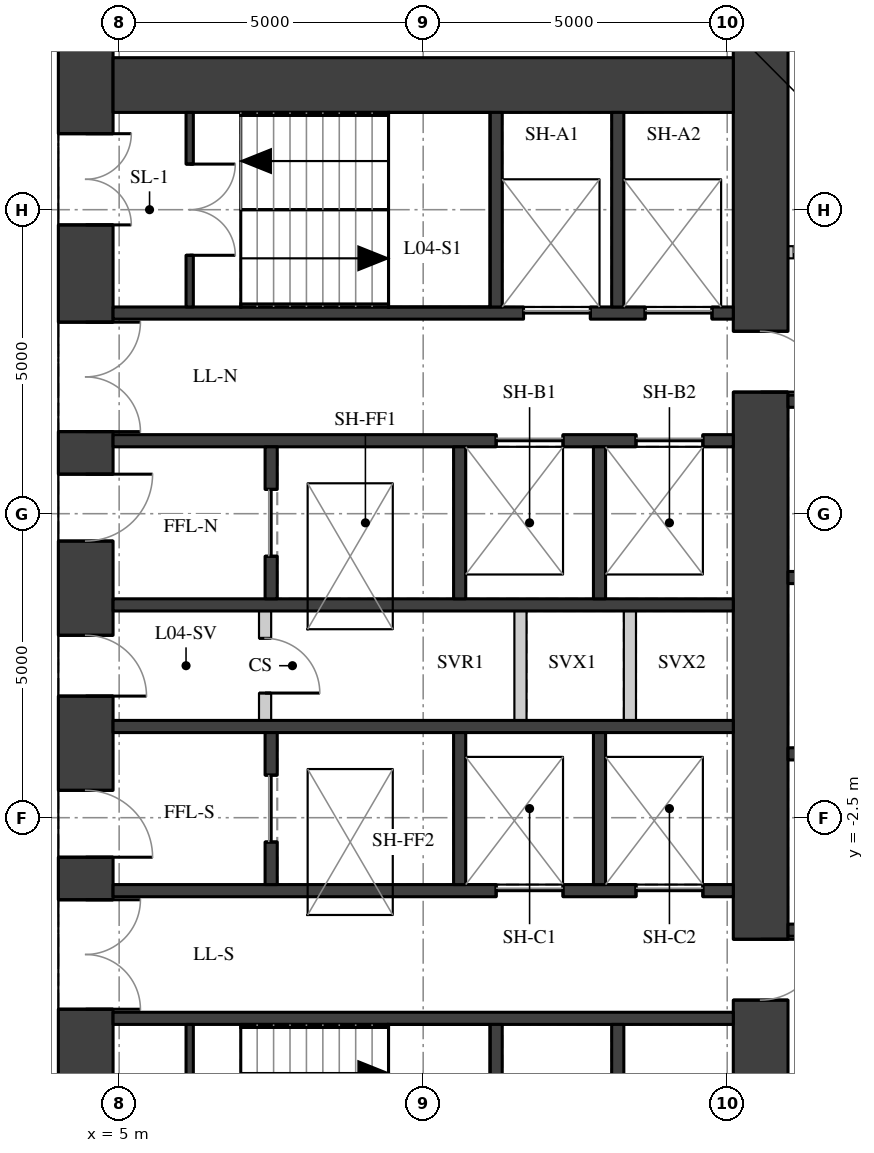
"""IFC4 building model, lengths in metres.
Left out: names, types, materials, properties, quantities, classifications, styles, units other than length and angle.
Written with IfcOpenShell. Run it as: python <this file> out.ifc"""

import sys

from ifc_helpers import new_model, si_unit, direction, frame, frame_2d, origin, place, context, subcontext, project, spatial, rectangle, extrude, element, fill, save


model = new_model("IFC4")
c1 = context("Model", 3, precision=1e-05, world=origin(), true_north=direction((0.0, 1.0)))
c2 = subcontext(c1, "Body", "Model", "MODEL_VIEW")
j1 = project(units=[si_unit("LENGTHUNIT", "METRE"), si_unit("PLANEANGLEUNIT", "RADIAN")], contexts=[c1])
p1 = place(None, origin())
s1 = spatial("IfcSite", under=j1, at=p1, CompositionType="ELEMENT")
p2 = place(p1, origin())
s2 = spatial("IfcBuilding", under=s1, at=p2, CompositionType="ELEMENT")
p3 = place(p2, frame((0.0, 0.0, 21.7)))
s3 = spatial("IfcBuildingStorey", under=s2, at=p3, CompositionType="ELEMENT", Elevation=21.7)
p4 = place(p3, frame((4.45, -11.1, 0.0), z_axis=(0.0, 0.0, 1.0), x_axis=(0.0, 1.0, 0.0)))
e1 = element("IfcWall", 1, at=p4, inside=s3, PredefinedType="SHEAR", context=c2, shape_type="SweptSolid", body=[
    extrude(rectangle(XDim=22.2, YDim=0.9, at=frame_2d((11.1, 0.0))), origin(), (0.0, 0.0, 1.0), 3.02),
])
p5 = place(p4, frame((2.35, 0.0, 0.0)))
e2 = element("IfcOpeningElement", 2, at=p5, cuts=e1, PredefinedType="OPENING", context=c2, shape_type="SweptSolid", body=[
    extrude(rectangle(XDim=1.5, YDim=2.1, at=frame_2d((0.75, 1.05))), frame((0.0, 0.46, 0.0), z_axis=(0.0, -1.0, 0.0), x_axis=(1.0, 0.0, 0.0)), (0.0, 0.0, 1.0), 0.92),
])
p6 = place(p4, frame((5.45, 0.0, 0.0)))
e3 = element("IfcOpeningElement", 3, at=p6, cuts=e1, PredefinedType="OPENING", context=c2, shape_type="SweptSolid", body=[
    extrude(rectangle(XDim=1.8, YDim=2.1, at=frame_2d((0.9, 1.05))), frame((0.0, 0.46, 0.0), z_axis=(0.0, -1.0, 0.0), x_axis=(1.0, 0.0, 0.0)), (0.0, 0.0, 1.0), 0.92),
])
p7 = place(p4, frame((7.95, 0.0, 0.0)))
e4 = element("IfcOpeningElement", 4, at=p7, cuts=e1, PredefinedType="OPENING", context=c2, shape_type="SweptSolid", body=[
    extrude(rectangle(XDim=1.1, YDim=2.1, at=frame_2d((0.55, 1.05))), frame((0.0, 0.46, 0.0), z_axis=(0.0, -1.0, 0.0), x_axis=(1.0, 0.0, 0.0)), (0.0, 0.0, 1.0), 0.92),
])
p8 = place(p4, frame((10.6, 0.0, 0.0)))
e5 = element("IfcOpeningElement", 5, at=p8, cuts=e1, PredefinedType="OPENING", context=c2, shape_type="SweptSolid", body=[
    extrude(rectangle(XDim=1.0, YDim=2.1, at=frame_2d((0.5, 1.05))), frame((0.0, 0.46, 0.0), z_axis=(0.0, -1.0, 0.0), x_axis=(1.0, 0.0, 0.0)), (0.0, 0.0, 1.0), 0.92),
])
p9 = place(p4, frame((13.15, 0.0, 0.0)))
e6 = element("IfcOpeningElement", 6, at=p9, cuts=e1, PredefinedType="OPENING", context=c2, shape_type="SweptSolid", body=[
    extrude(rectangle(XDim=1.1, YDim=2.1, at=frame_2d((0.55, 1.05))), frame((0.0, 0.46, 0.0), z_axis=(0.0, -1.0, 0.0), x_axis=(1.0, 0.0, 0.0)), (0.0, 0.0, 1.0), 0.92),
])
p10 = place(p4, frame((14.95, 0.0, 0.0)))
e7 = element("IfcOpeningElement", 7, at=p10, cuts=e1, PredefinedType="OPENING", context=c2, shape_type="SweptSolid", body=[
    extrude(rectangle(XDim=1.8, YDim=2.1, at=frame_2d((0.9, 1.05))), frame((0.0, 0.46, 0.0), z_axis=(0.0, -1.0, 0.0), x_axis=(1.0, 0.0, 0.0)), (0.0, 0.0, 1.0), 0.92),
])
p11 = place(p4, frame((18.35, 0.0, 0.0)))
e8 = element("IfcOpeningElement", 8, at=p11, cuts=e1, PredefinedType="OPENING", context=c2, shape_type="SweptSolid", body=[
    extrude(rectangle(XDim=1.5, YDim=2.1, at=frame_2d((0.75, 1.05))), frame((0.0, 0.46, 0.0), z_axis=(0.0, -1.0, 0.0), x_axis=(1.0, 0.0, 0.0)), (0.0, 0.0, 1.0), 0.92),
])
p12 = place(p3, frame((15.55, -11.1, 0.0), z_axis=(0.0, 0.0, 1.0), x_axis=(0.0, 1.0, 0.0)))
e9 = element("IfcWall", 9, at=p12, inside=s3, PredefinedType="SHEAR", context=c2, shape_type="SweptSolid", body=[
    extrude(rectangle(XDim=22.2, YDim=0.9, at=frame_2d((11.1, 0.0))), origin(), (0.0, 0.0, 1.0), 3.02),
])
p13 = place(p12, frame((15.6, 0.0, 0.0)))
e10 = element("IfcOpeningElement", 10, at=p13, cuts=e9, PredefinedType="OPENING", context=c2, shape_type="SweptSolid", body=[
    extrude(rectangle(XDim=1.0, YDim=2.1, at=frame_2d((0.5, 1.05))), frame((0.0, 0.46, 0.0), z_axis=(0.0, -1.0, 0.0), x_axis=(1.0, 0.0, 0.0)), (0.0, 0.0, 1.0), 0.92),
])
p14 = place(p12, frame((5.6, 0.0, 0.0)))
e11 = element("IfcOpeningElement", 11, at=p14, cuts=e9, PredefinedType="OPENING", context=c2, shape_type="SweptSolid", body=[
    extrude(rectangle(XDim=1.0, YDim=2.1, at=frame_2d((0.5, 1.05))), frame((0.0, 0.46, 0.0), z_axis=(0.0, -1.0, 0.0), x_axis=(1.0, 0.0, 0.0)), (0.0, 0.0, 1.0), 0.92),
])
p15 = place(p3, frame((4.9, 9.55, 0.0), z_axis=(0.0, 0.0, 1.0), x_axis=(1.0, 0.0, 0.0)))
e12 = element("IfcWall", 12, at=p15, inside=s3, PredefinedType="SHEAR", context=c2, shape_type="SweptSolid", body=[
    extrude(rectangle(XDim=10.2, YDim=0.9, at=frame_2d((5.1, 0.0))), origin(), (0.0, 0.0, 1.0), 3.02),
])
p16 = place(p3, frame((4.9, 5.8, 0.0), z_axis=(0.0, 0.0, 1.0), x_axis=(1.0, 0.0, 0.0)))
e13 = element("IfcWall", 13, at=p16, inside=s3, PredefinedType="SHEAR", context=c2, shape_type="SweptSolid", body=[
    extrude(rectangle(XDim=10.2, YDim=0.2, at=frame_2d((5.1, 0.0))), origin(), (0.0, 0.0, 1.0), 3.02),
])
p17 = place(p16, frame((6.75, 0.0, 0.0)))
e14 = element("IfcOpeningElement", 14, at=p17, cuts=e13, PredefinedType="OPENING", context=c2, shape_type="SweptSolid", body=[
    extrude(rectangle(XDim=1.1, YDim=2.1, at=frame_2d((0.55, 1.05))), frame((0.0, 0.11, 0.0), z_axis=(0.0, -1.0, 0.0), x_axis=(1.0, 0.0, 0.0)), (0.0, 0.0, 1.0), 0.22),
])
p18 = place(p16, frame((8.75, 0.0, 0.0)))
e15 = element("IfcOpeningElement", 15, at=p18, cuts=e13, PredefinedType="OPENING", context=c2, shape_type="SweptSolid", body=[
    extrude(rectangle(XDim=1.1, YDim=2.1, at=frame_2d((0.55, 1.05))), frame((0.0, 0.11, 0.0), z_axis=(0.0, -1.0, 0.0), x_axis=(1.0, 0.0, 0.0)), (0.0, 0.0, 1.0), 0.22),
])
p19 = place(p3, frame((4.9, 3.7, 0.0), z_axis=(0.0, 0.0, 1.0), x_axis=(1.0, 0.0, 0.0)))
e16 = element("IfcWall", 16, at=p19, inside=s3, PredefinedType="SHEAR", context=c2, shape_type="SweptSolid", body=[
    extrude(rectangle(XDim=10.2, YDim=0.2, at=frame_2d((5.1, 0.0))), origin(), (0.0, 0.0, 1.0), 3.02),
])
p20 = place(p19, frame((6.3, 0.0, 0.0)))
e17 = element("IfcOpeningElement", 17, at=p20, cuts=e16, PredefinedType="OPENING", context=c2, shape_type="SweptSolid", body=[
    extrude(rectangle(XDim=1.1, YDim=2.1, at=frame_2d((0.55, 1.05))), frame((0.0, 0.11, 0.0), z_axis=(0.0, -1.0, 0.0), x_axis=(1.0, 0.0, 0.0)), (0.0, 0.0, 1.0), 0.22),
])
p21 = place(p19, frame((8.6, 0.0, 0.0)))
e18 = element("IfcOpeningElement", 18, at=p21, cuts=e16, PredefinedType="OPENING", context=c2, shape_type="SweptSolid", body=[
    extrude(rectangle(XDim=1.1, YDim=2.1, at=frame_2d((0.55, 1.05))), frame((0.0, 0.11, 0.0), z_axis=(0.0, -1.0, 0.0), x_axis=(1.0, 0.0, 0.0)), (0.0, 0.0, 1.0), 0.22),
])
for number, where, z_axis, x_axis in (
    (19, (4.9, 1.0, 0.0), (0.0, 0.0, 1.0), (1.0, 0.0, 0.0)),
    (20, (4.9, -1.0, 0.0), (0.0, 0.0, 1.0), (1.0, 0.0, 0.0)),
):
    element("IfcWall", number, at=place(p3, frame(where, z_axis=z_axis, x_axis=x_axis)), inside=s3, PredefinedType="SHEAR", context=c2, shape_type="SweptSolid", body=[
        extrude(rectangle(XDim=10.2, YDim=0.2, at=frame_2d((5.1, 0.0))), origin(), (0.0, 0.0, 1.0), 3.02),
    ])
p22 = place(p3, frame((4.9, -3.7, 0.0), z_axis=(0.0, 0.0, 1.0), x_axis=(1.0, 0.0, 0.0)))
e21 = element("IfcWall", 21, at=p22, inside=s3, PredefinedType="SHEAR", context=c2, shape_type="SweptSolid", body=[
    extrude(rectangle(XDim=10.2, YDim=0.2, at=frame_2d((5.1, 0.0))), origin(), (0.0, 0.0, 1.0), 3.02),
])
p23 = place(p22, frame((6.3, 0.0, 0.0)))
e22 = element("IfcOpeningElement", 22, at=p23, cuts=e21, PredefinedType="OPENING", context=c2, shape_type="SweptSolid", body=[
    extrude(rectangle(XDim=1.1, YDim=2.1, at=frame_2d((0.55, 1.05))), frame((0.0, 0.11, 0.0), z_axis=(0.0, -1.0, 0.0), x_axis=(1.0, 0.0, 0.0)), (0.0, 0.0, 1.0), 0.22),
])
p24 = place(p22, frame((8.6, 0.0, 0.0)))
e23 = element("IfcOpeningElement", 23, at=p24, cuts=e21, PredefinedType="OPENING", context=c2, shape_type="SweptSolid", body=[
    extrude(rectangle(XDim=1.1, YDim=2.1, at=frame_2d((0.55, 1.05))), frame((0.0, 0.11, 0.0), z_axis=(0.0, -1.0, 0.0), x_axis=(1.0, 0.0, 0.0)), (0.0, 0.0, 1.0), 0.22),
])
p25 = place(p3, frame((4.9, -5.8, 0.0), z_axis=(0.0, 0.0, 1.0), x_axis=(1.0, 0.0, 0.0)))
e24 = element("IfcWall", 24, at=p25, inside=s3, PredefinedType="SHEAR", context=c2, shape_type="SweptSolid", body=[
    extrude(rectangle(XDim=10.2, YDim=0.2, at=frame_2d((5.1, 0.0))), origin(), (0.0, 0.0, 1.0), 3.02),
])
for number, where, z_axis, x_axis in (
    (25, (11.2, 5.9, 0.0), (0.0, 0.0, 1.0), (0.0, 1.0, 0.0)),
    (26, (11.2, -9.1, 0.0), (0.0, 0.0, 1.0), (0.0, 1.0, 0.0)),
    (27, (13.2, 5.9, 0.0), (0.0, 0.0, 1.0), (0.0, 1.0, 0.0)),
    (28, (13.2, -9.1, 0.0), (0.0, 0.0, 1.0), (0.0, 1.0, 0.0)),
):
    element("IfcWall", number, at=place(p3, frame(where, z_axis=z_axis, x_axis=x_axis)), inside=s3, PredefinedType="SHEAR", context=c2, shape_type="SweptSolid", body=[
        extrude(rectangle(XDim=3.2, YDim=0.2, at=frame_2d((1.6, 0.0))), origin(), (0.0, 0.0, 1.0), 3.02),
    ])
p26 = place(p3, frame((7.5, 1.1, 0.0), z_axis=(0.0, 0.0, 1.0), x_axis=(0.0, 1.0, 0.0)))
e29 = element("IfcWall", 29, at=p26, inside=s3, PredefinedType="SHEAR", context=c2, shape_type="SweptSolid", body=[
    extrude(rectangle(XDim=2.5, YDim=0.2, at=frame_2d((1.25, 0.0))), origin(), (0.0, 0.0, 1.0), 3.02),
])
p27 = place(p26, frame((0.7, 0.0, 0.0)))
e30 = element("IfcOpeningElement", 30, at=p27, cuts=e29, PredefinedType="OPENING", context=c2, shape_type="SweptSolid", body=[
    extrude(rectangle(XDim=1.1, YDim=2.1, at=frame_2d((0.55, 1.05))), frame((0.0, 0.11, 0.0), z_axis=(0.0, -1.0, 0.0), x_axis=(1.0, 0.0, 0.0)), (0.0, 0.0, 1.0), 0.22),
])
p28 = place(p3, frame((7.5, -3.6, 0.0), z_axis=(0.0, 0.0, 1.0), x_axis=(0.0, 1.0, 0.0)))
e31 = element("IfcWall", 31, at=p28, inside=s3, PredefinedType="SHEAR", context=c2, shape_type="SweptSolid", body=[
    extrude(rectangle(XDim=2.5, YDim=0.2, at=frame_2d((1.25, 0.0))), origin(), (0.0, 0.0, 1.0), 3.02),
])
p29 = place(p28, frame((0.7, 0.0, 0.0)))
e32 = element("IfcOpeningElement", 32, at=p29, cuts=e31, PredefinedType="OPENING", context=c2, shape_type="SweptSolid", body=[
    extrude(rectangle(XDim=1.1, YDim=2.1, at=frame_2d((0.55, 1.05))), frame((0.0, 0.11, 0.0), z_axis=(0.0, -1.0, 0.0), x_axis=(1.0, 0.0, 0.0)), (0.0, 0.0, 1.0), 0.22),
])
for number, where, z_axis, x_axis in (
    (33, (10.6, 1.1, 0.0), (0.0, 0.0, 1.0), (0.0, 1.0, 0.0)),
    (34, (10.6, -3.6, 0.0), (0.0, 0.0, 1.0), (0.0, 1.0, 0.0)),
    (35, (12.9, 1.1, 0.0), (0.0, 0.0, 1.0), (0.0, 1.0, 0.0)),
    (36, (12.9, -3.6, 0.0), (0.0, 0.0, 1.0), (0.0, 1.0, 0.0)),
):
    element("IfcWall", number, at=place(p3, frame(where, z_axis=z_axis, x_axis=x_axis)), inside=s3, PredefinedType="SHEAR", context=c2, shape_type="SweptSolid", body=[
        extrude(rectangle(XDim=2.5, YDim=0.2, at=frame_2d((1.25, 0.0))), origin(), (0.0, 0.0, 1.0), 3.02),
    ])
p30 = place(p3, frame((6.16, 5.9, 0.0), z_axis=(0.0, 0.0, 1.0), x_axis=(0.0, 1.0, 0.0)))
e37 = element("IfcWall", 37, at=p30, inside=s3, PredefinedType="SHEAR", context=c2, shape_type="SweptSolid", body=[
    extrude(rectangle(XDim=3.2, YDim=0.12, at=frame_2d((1.6, 0.0))), origin(), (0.0, 0.0, 1.0), 3.02),
])
p31 = place(p30, frame((0.85, 0.0, 0.0)))
e38 = element("IfcOpeningElement", 38, at=p31, cuts=e37, PredefinedType="OPENING", context=c2, shape_type="SweptSolid", body=[
    extrude(rectangle(XDim=1.5, YDim=2.1, at=frame_2d((0.75, 1.05))), frame((0.0, 0.07, 0.0), z_axis=(0.0, -1.0, 0.0), x_axis=(1.0, 0.0, 0.0)), (0.0, 0.0, 1.0), 0.14),
])
p32 = place(p3, frame((6.16, -9.1, 0.0), z_axis=(0.0, 0.0, 1.0), x_axis=(0.0, 1.0, 0.0)))
e39 = element("IfcWall", 39, at=p32, inside=s3, PredefinedType="SHEAR", context=c2, shape_type="SweptSolid", body=[
    extrude(rectangle(XDim=3.2, YDim=0.12, at=frame_2d((1.6, 0.0))), origin(), (0.0, 0.0, 1.0), 3.02),
])
p33 = place(p32, frame((0.85, 0.0, 0.0)))
e40 = element("IfcOpeningElement", 40, at=p33, cuts=e39, PredefinedType="OPENING", context=c2, shape_type="SweptSolid", body=[
    extrude(rectangle(XDim=1.5, YDim=2.1, at=frame_2d((0.75, 1.05))), frame((0.0, 0.07, 0.0), z_axis=(0.0, -1.0, 0.0), x_axis=(1.0, 0.0, 0.0)), (0.0, 0.0, 1.0), 0.14),
])
p34 = place(p3, frame((7.4, -0.9, 0.0), z_axis=(0.0, 0.0, 1.0), x_axis=(0.0, 1.0, 0.0)))
e41 = element("IfcWall", 41, at=p34, inside=s3, PredefinedType="PARTITIONING", context=c2, shape_type="SweptSolid", body=[
    extrude(rectangle(XDim=1.8, YDim=0.2, at=frame_2d((0.9, 0.0))), origin(), (0.0, 0.0, 1.0), 3.02),
])
p35 = place(p34, frame((0.45, 0.0, 0.0)))
e42 = element("IfcOpeningElement", 42, at=p35, cuts=e41, PredefinedType="OPENING", context=c2, shape_type="SweptSolid", body=[
    extrude(rectangle(XDim=0.9, YDim=2.1, at=frame_2d((0.45, 1.05))), frame((0.0, 0.11, 0.0), z_axis=(0.0, -1.0, 0.0), x_axis=(1.0, 0.0, 0.0)), (0.0, 0.0, 1.0), 0.22),
])
for number, where, z_axis, x_axis in (
    (43, (11.6, -0.9, 0.0), (0.0, 0.0, 1.0), (0.0, 1.0, 0.0)),
    (44, (13.4, -0.9, 0.0), (0.0, 0.0, 1.0), (0.0, 1.0, 0.0)),
):
    element("IfcWall", number, at=place(p3, frame(where, z_axis=z_axis, x_axis=x_axis)), inside=s3, PredefinedType="PARTITIONING", context=c2, shape_type="SweptSolid", body=[
        extrude(rectangle(XDim=1.8, YDim=0.2, at=frame_2d((0.9, 0.0))), origin(), (0.0, 0.0, 1.0), 3.02),
    ])
for number, where, z_axis, x_axis in (
    (45, (16.0, -4.35, 0.0), (0.0, 0.0, 1.0), (1.0, 0.0, 0.0)),
    (46, (16.0, -1.45, 0.0), (0.0, 0.0, 1.0), (1.0, 0.0, 0.0)),
    (47, (16.0, 1.45, 0.0), (0.0, 0.0, 1.0), (1.0, 0.0, 0.0)),
    (48, (16.0, 4.35, 0.0), (0.0, 0.0, 1.0), (1.0, 0.0, 0.0)),
):
    element("IfcWall", number, at=place(p3, frame(where, z_axis=z_axis, x_axis=x_axis)), inside=s3, PredefinedType="SHEAR", context=c2, shape_type="SweptSolid", body=[
        extrude(rectangle(XDim=2.3, YDim=0.2, at=frame_2d((1.15, 0.0))), origin(), (0.0, 0.0, 1.0), 3.02),
    ])
p36 = place(p3, frame((16.0, 6.8, 0.0), z_axis=(0.0, 0.0, 1.0), x_axis=(1.0, 0.0, 0.0)))
e49 = element("IfcWall", 49, at=p36, inside=s3, PredefinedType="PARTITIONING", context=c2, shape_type="SweptSolid", body=[
    extrude(rectangle(XDim=2.3, YDim=0.2, at=frame_2d((1.15, 0.0))), origin(), (0.0, 0.0, 1.0), 3.02),
])
p37 = place(p36, frame((0.1, 0.0, 0.0)))
e50 = element("IfcOpeningElement", 50, at=p37, cuts=e49, PredefinedType="OPENING", context=c2, shape_type="SweptSolid", body=[
    extrude(rectangle(XDim=0.9, YDim=2.1, at=frame_2d((0.45, 1.05))), frame((0.0, 0.11, 0.0), z_axis=(0.0, -1.0, 0.0), x_axis=(1.0, 0.0, 0.0)), (0.0, 0.0, 1.0), 0.22),
])
p38 = place(p6, origin())
e51 = element("IfcDoor", 51, at=p38, inside=s3, OperationType="DOUBLE_DOOR_SINGLE_SWING", PredefinedType="DOOR", context=c2, shape_type="SweptSolid", body=[
    extrude(rectangle(XDim=1.8, YDim=2.1, at=frame_2d((0.9, 1.05))), frame((0.0, 0.025, 0.0), z_axis=(0.0, -1.0, 0.0), x_axis=(1.0, 0.0, 0.0)), (0.0, 0.0, 1.0), 0.05),
])
fill(e3, e51)
p39 = place(p7, origin())
e52 = element("IfcDoor", 52, at=p39, inside=s3, OperationType="SINGLE_SWING_RIGHT", PredefinedType="DOOR", context=c2, shape_type="SweptSolid", body=[
    extrude(rectangle(XDim=1.1, YDim=2.1, at=frame_2d((0.55, 1.05))), frame((0.0, 0.025, 0.0), z_axis=(0.0, -1.0, 0.0), x_axis=(1.0, 0.0, 0.0)), (0.0, 0.0, 1.0), 0.05),
])
fill(e4, e52)
p40 = place(p8, origin())
e53 = element("IfcDoor", 53, at=p40, inside=s3, OperationType="SINGLE_SWING_RIGHT", PredefinedType="DOOR", context=c2, shape_type="SweptSolid", body=[
    extrude(rectangle(XDim=1.0, YDim=2.1, at=frame_2d((0.5, 1.05))), frame((0.0, 0.025, 0.0), z_axis=(0.0, -1.0, 0.0), x_axis=(1.0, 0.0, 0.0)), (0.0, 0.0, 1.0), 0.05),
])
fill(e5, e53)
p41 = place(p9, origin())
e54 = element("IfcDoor", 54, at=p41, inside=s3, OperationType="SINGLE_SWING_LEFT", PredefinedType="DOOR", context=c2, shape_type="SweptSolid", body=[
    extrude(rectangle(XDim=1.1, YDim=2.1, at=frame_2d((0.55, 1.05))), frame((0.0, 0.025, 0.0), z_axis=(0.0, -1.0, 0.0), x_axis=(1.0, 0.0, 0.0)), (0.0, 0.0, 1.0), 0.05),
])
fill(e6, e54)
p42 = place(p10, origin())
e55 = element("IfcDoor", 55, at=p42, inside=s3, OperationType="DOUBLE_DOOR_SINGLE_SWING", PredefinedType="DOOR", context=c2, shape_type="SweptSolid", body=[
    extrude(rectangle(XDim=1.8, YDim=2.1, at=frame_2d((0.9, 1.05))), frame((0.0, 0.025, 0.0), z_axis=(0.0, -1.0, 0.0), x_axis=(1.0, 0.0, 0.0)), (0.0, 0.0, 1.0), 0.05),
])
fill(e7, e55)
p43 = place(p11, origin())
e56 = element("IfcDoor", 56, at=p43, inside=s3, OperationType="DOUBLE_DOOR_SINGLE_SWING", PredefinedType="DOOR", context=c2, shape_type="SweptSolid", body=[
    extrude(rectangle(XDim=1.5, YDim=2.1, at=frame_2d((0.75, 1.05))), frame((0.0, 0.025, 0.0), z_axis=(0.0, -1.0, 0.0), x_axis=(1.0, 0.0, 0.0)), (0.0, 0.0, 1.0), 0.05),
])
fill(e8, e56)
p44 = place(p31, origin())
e57 = element("IfcDoor", 57, at=p44, inside=s3, OperationType="DOUBLE_DOOR_SINGLE_SWING", PredefinedType="DOOR", context=c2, shape_type="SweptSolid", body=[
    extrude(rectangle(XDim=1.5, YDim=2.1, at=frame_2d((0.75, 1.05))), frame((0.0, 0.025, 0.0), z_axis=(0.0, -1.0, 0.0), x_axis=(1.0, 0.0, 0.0)), (0.0, 0.0, 1.0), 0.05),
])
fill(e38, e57)
p45 = place(p17, origin())
e58 = element("IfcDoor", 58, at=p45, inside=s3, OperationType="DOUBLE_DOOR_SLIDING", PredefinedType="DOOR", context=c2, shape_type="SweptSolid", body=[
    extrude(rectangle(XDim=1.1, YDim=2.1, at=frame_2d((0.55, 1.05))), frame((0.0, 0.025, 0.0), z_axis=(0.0, -1.0, 0.0), x_axis=(1.0, 0.0, 0.0)), (0.0, 0.0, 1.0), 0.05),
])
fill(e14, e58)
p46 = place(p18, origin())
e59 = element("IfcDoor", 59, at=p46, inside=s3, OperationType="DOUBLE_DOOR_SLIDING", PredefinedType="DOOR", context=c2, shape_type="SweptSolid", body=[
    extrude(rectangle(XDim=1.1, YDim=2.1, at=frame_2d((0.55, 1.05))), frame((0.0, 0.025, 0.0), z_axis=(0.0, -1.0, 0.0), x_axis=(1.0, 0.0, 0.0)), (0.0, 0.0, 1.0), 0.05),
])
fill(e15, e59)
p47 = place(p20, origin())
e60 = element("IfcDoor", 60, at=p47, inside=s3, OperationType="DOUBLE_DOOR_SLIDING", PredefinedType="DOOR", context=c2, shape_type="SweptSolid", body=[
    extrude(rectangle(XDim=1.1, YDim=2.1, at=frame_2d((0.55, 1.05))), frame((0.0, 0.025, 0.0), z_axis=(0.0, -1.0, 0.0), x_axis=(1.0, 0.0, 0.0)), (0.0, 0.0, 1.0), 0.05),
])
fill(e17, e60)
p48 = place(p21, origin())
e61 = element("IfcDoor", 61, at=p48, inside=s3, OperationType="DOUBLE_DOOR_SLIDING", PredefinedType="DOOR", context=c2, shape_type="SweptSolid", body=[
    extrude(rectangle(XDim=1.1, YDim=2.1, at=frame_2d((0.55, 1.05))), frame((0.0, 0.025, 0.0), z_axis=(0.0, -1.0, 0.0), x_axis=(1.0, 0.0, 0.0)), (0.0, 0.0, 1.0), 0.05),
])
fill(e18, e61)
p49 = place(p23, origin())
e62 = element("IfcDoor", 62, at=p49, inside=s3, OperationType="DOUBLE_DOOR_SLIDING", PredefinedType="DOOR", context=c2, shape_type="SweptSolid", body=[
    extrude(rectangle(XDim=1.1, YDim=2.1, at=frame_2d((0.55, 1.05))), frame((0.0, 0.025, 0.0), z_axis=(0.0, -1.0, 0.0), x_axis=(1.0, 0.0, 0.0)), (0.0, 0.0, 1.0), 0.05),
])
fill(e22, e62)
p50 = place(p24, origin())
e63 = element("IfcDoor", 63, at=p50, inside=s3, OperationType="DOUBLE_DOOR_SLIDING", PredefinedType="DOOR", context=c2, shape_type="SweptSolid", body=[
    extrude(rectangle(XDim=1.1, YDim=2.1, at=frame_2d((0.55, 1.05))), frame((0.0, 0.025, 0.0), z_axis=(0.0, -1.0, 0.0), x_axis=(1.0, 0.0, 0.0)), (0.0, 0.0, 1.0), 0.05),
])
fill(e23, e63)
p51 = place(p27, origin())
e64 = element("IfcDoor", 64, at=p51, inside=s3, OperationType="DOUBLE_DOOR_SLIDING", PredefinedType="DOOR", context=c2, shape_type="SweptSolid", body=[
    extrude(rectangle(XDim=1.1, YDim=2.1, at=frame_2d((0.55, 1.05))), frame((0.0, 0.025, 0.0), z_axis=(0.0, -1.0, 0.0), x_axis=(1.0, 0.0, 0.0)), (0.0, 0.0, 1.0), 0.05),
])
fill(e30, e64)
p52 = place(p29, origin())
e65 = element("IfcDoor", 65, at=p52, inside=s3, OperationType="DOUBLE_DOOR_SLIDING", PredefinedType="DOOR", context=c2, shape_type="SweptSolid", body=[
    extrude(rectangle(XDim=1.1, YDim=2.1, at=frame_2d((0.55, 1.05))), frame((0.0, 0.025, 0.0), z_axis=(0.0, -1.0, 0.0), x_axis=(1.0, 0.0, 0.0)), (0.0, 0.0, 1.0), 0.05),
])
fill(e32, e65)
p53 = place(p35, origin())
e66 = element("IfcDoor", 66, at=p53, inside=s3, OperationType="SINGLE_SWING_RIGHT", PredefinedType="DOOR", context=c2, shape_type="SweptSolid", body=[
    extrude(rectangle(XDim=0.9, YDim=2.1, at=frame_2d((0.45, 1.05))), frame((0.0, 0.025, 0.0), z_axis=(0.0, -1.0, 0.0), x_axis=(1.0, 0.0, 0.0)), (0.0, 0.0, 1.0), 0.05),
])
fill(e42, e66)
p54 = place(p13, origin())
e67 = element("IfcDoor", 67, at=p54, inside=s3, OperationType="SINGLE_SWING_RIGHT", PredefinedType="DOOR", context=c2, shape_type="SweptSolid", body=[
    extrude(rectangle(XDim=1.0, YDim=2.1, at=frame_2d((0.5, 1.05))), frame((0.0, 0.025, 0.0), z_axis=(0.0, -1.0, 0.0), x_axis=(1.0, 0.0, 0.0)), (0.0, 0.0, 1.0), 0.05),
])
fill(e10, e67)
p55 = place(p14, origin())
e68 = element("IfcDoor", 68, at=p55, inside=s3, OperationType="SINGLE_SWING_LEFT", PredefinedType="DOOR", context=c2, shape_type="SweptSolid", body=[
    extrude(rectangle(XDim=1.0, YDim=2.1, at=frame_2d((0.5, 1.05))), frame((0.0, 0.025, 0.0), z_axis=(0.0, -1.0, 0.0), x_axis=(1.0, 0.0, 0.0)), (0.0, 0.0, 1.0), 0.05),
])
fill(e11, e68)
save(model, sys.argv[1])
